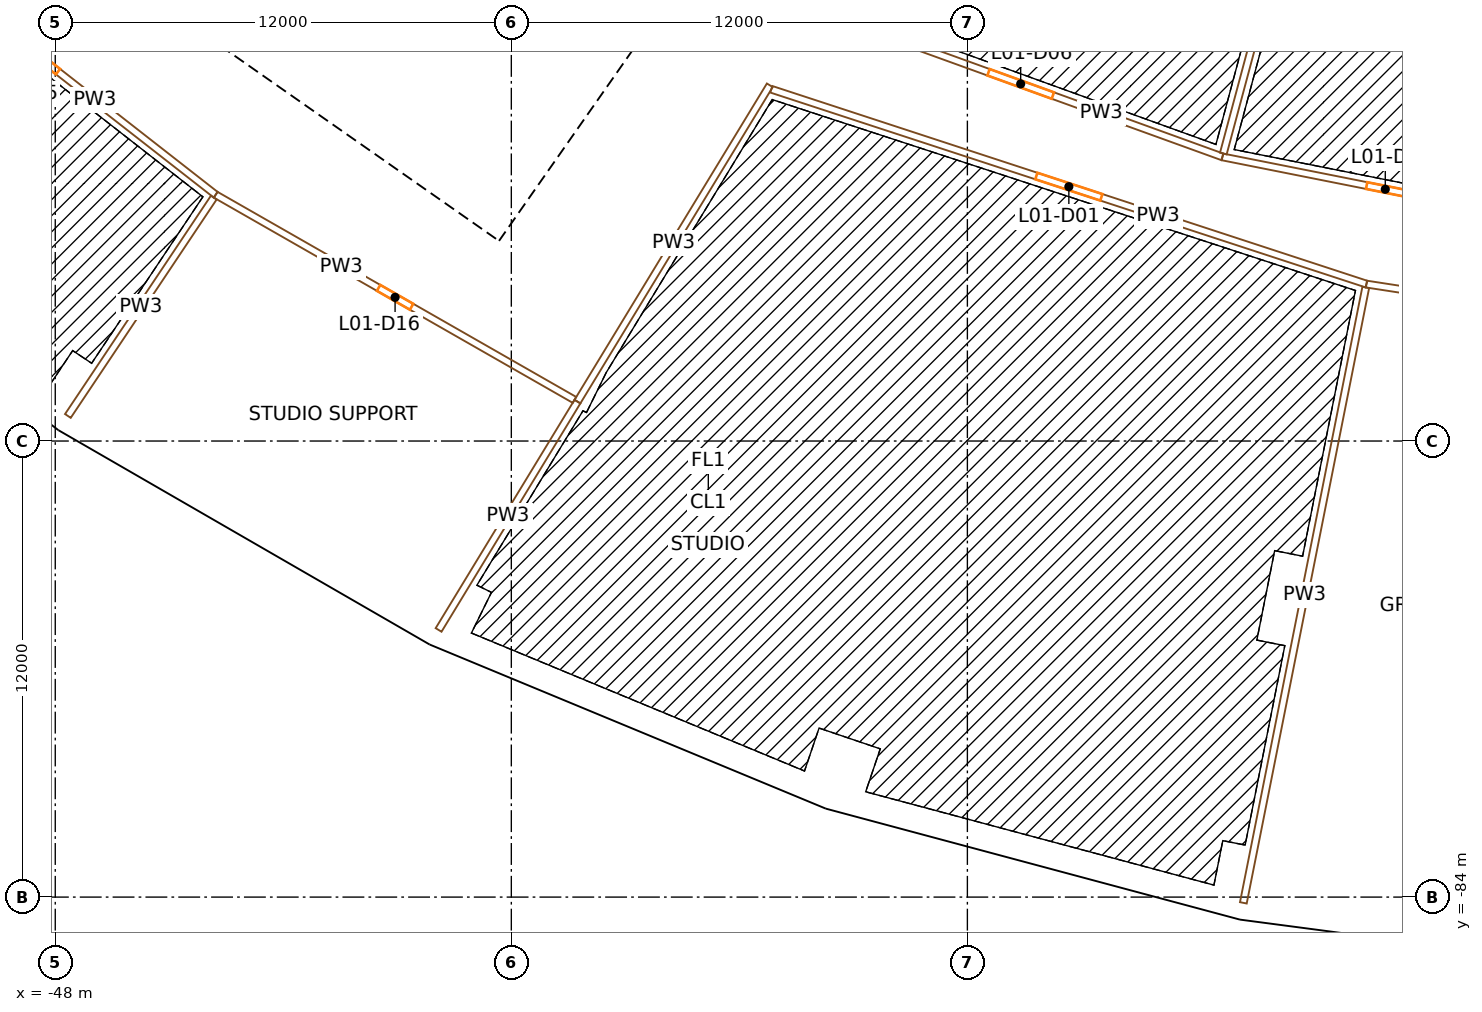
"""IFC4 building model, lengths in metres.
Left out: names, types, materials, properties, quantities, classifications, styles, units other than length and angle.
Written with IfcOpenShell. Run it as: python <this file> out.ifc"""

import sys

from ifc_helpers import new_model, si_unit, direction, frame, frame_2d, origin, origin_2d, place, context, subcontext, project, spatial, rectangle, extrude, element, fill, save


model = new_model("IFC4")
c1 = context("Model", 3, precision=1e-05, world=origin(), true_north=direction((0.0, 1.0)))
c2 = subcontext(c1, "Body", "Model", "MODEL_VIEW")
j1 = project(units=[si_unit("LENGTHUNIT", "METRE"), si_unit("PLANEANGLEUNIT", "RADIAN")], contexts=[c1])
p1 = place(None, origin())
s1 = spatial("IfcSite", under=j1, at=p1, CompositionType="ELEMENT")
p2 = place(p1, origin())
s2 = spatial("IfcBuilding", under=s1, at=p2, CompositionType="ELEMENT")
p3 = place(p2, frame((0.0, 0.0, 9.0)))
s3 = spatial("IfcBuildingStorey", under=s2, at=p3, CompositionType="ELEMENT", Elevation=9.0)
p4 = place(p3, frame((-43.196, -64.647, 0.0), z_axis=(0.0, 0.0, 1.0), x_axis=(0.831469612303, -0.55557023302, 0.0)))
e1 = element("IfcColumn", 1, at=p4, inside=s3, PredefinedType="COLUMN", context=c2, shape_type="SweptSolid", body=[
    extrude(rectangle(XDim=1.4, YDim=1.8, at=origin_2d()), origin(), (0.0, 0.0, 1.0), 9.0),
])
p5 = place(p3, frame((-47.362, -70.883, 0.0), z_axis=(0.0, 0.0, 1.0), x_axis=(0.831469612303, -0.55557023302, 0.0)))
e2 = element("IfcColumn", 2, at=p5, inside=s3, PredefinedType="COLUMN", context=c2, shape_type="SweptSolid", body=[
    extrude(rectangle(XDim=1.1, YDim=1.3, at=origin_2d()), origin(), (0.0, 0.0, 1.0), 9.0),
])
p6 = place(p3, frame((-34.388, -69.732, 0.0), z_axis=(0.0, 0.0, 1.0), x_axis=(0.896872741533, -0.442288690219, 0.0)))
e3 = element("IfcColumn", 3, at=p6, inside=s3, PredefinedType="COLUMN", context=c2, shape_type="SweptSolid", body=[
    extrude(rectangle(XDim=1.4, YDim=1.8, at=origin_2d()), origin(), (0.0, 0.0, 1.0), 9.0),
])
p7 = place(p3, frame((-37.705, -76.458, 0.0), z_axis=(0.0, 0.0, 1.0), x_axis=(0.896872741533, -0.442288690219, 0.0)))
e4 = element("IfcColumn", 4, at=p7, inside=s3, PredefinedType="COLUMN", context=c2, shape_type="SweptSolid", body=[
    extrude(rectangle(XDim=1.1, YDim=1.3, at=origin_2d()), origin(), (0.0, 0.0, 1.0), 9.0),
])
p8 = place(p3, frame((-24.992, -73.624, 0.0), z_axis=(0.0, 0.0, 1.0), x_axis=(0.946930129495, -0.321439465303, 0.0)))
e5 = element("IfcColumn", 5, at=p8, inside=s3, PredefinedType="COLUMN", context=c2, shape_type="SweptSolid", body=[
    extrude(rectangle(XDim=1.4, YDim=1.8, at=origin_2d()), origin(), (0.0, 0.0, 1.0), 9.0),
])
p9 = place(p3, frame((-27.403, -80.726, 0.0), z_axis=(0.0, 0.0, 1.0), x_axis=(0.946930129495, -0.321439465303, 0.0)))
e6 = element("IfcColumn", 6, at=p9, inside=s3, PredefinedType="COLUMN", context=c2, shape_type="SweptSolid", body=[
    extrude(rectangle(XDim=1.1, YDim=1.3, at=origin_2d()), origin(), (0.0, 0.0, 1.0), 9.0),
])
p10 = place(p3, frame((-15.168, -76.256, 0.0), z_axis=(0.0, 0.0, 1.0), x_axis=(0.980785280403, -0.195090322016, 0.0)))
e7 = element("IfcColumn", 7, at=p10, inside=s3, PredefinedType="COLUMN", context=c2, shape_type="SweptSolid", body=[
    extrude(rectangle(XDim=1.4, YDim=1.8, at=origin_2d()), origin(), (0.0, 0.0, 1.0), 9.0),
])
p11 = place(p3, frame((-16.631, -83.612, 0.0), z_axis=(0.0, 0.0, 1.0), x_axis=(0.980785280403, -0.195090322016, 0.0)))
e8 = element("IfcColumn", 8, at=p11, inside=s3, PredefinedType="COLUMN", context=c2, shape_type="SweptSolid", body=[
    extrude(rectangle(XDim=1.1, YDim=1.3, at=origin_2d()), origin(), (0.0, 0.0, 1.0), 9.0),
])
p12 = place(p3, frame((-36.717, -66.337, 0.0), z_axis=(0.0, 0.0, 1.0), x_axis=(0.573577477574, 0.819151315216, 0.0)))
e9 = element("IfcWall", 9, at=p12, inside=s3, PredefinedType="SHEAR", context=c2, shape_type="SweptSolid", body=[
    extrude(rectangle(XDim=14.8, YDim=0.9, at=frame_2d((7.4, 0.0))), origin(), (0.0, 0.0, 1.0), 8.6),
])
p13 = place(p12, frame((6.2, 0.0, 0.0)))
e10 = element("IfcOpeningElement", 10, at=p13, cuts=e9, PredefinedType="OPENING", context=c2, shape_type="SweptSolid", body=[
    extrude(rectangle(XDim=2.4, YDim=2.1, at=frame_2d((1.2, 1.05))), frame((0.0, 0.46, 0.0), z_axis=(0.0, -1.0, 0.0), x_axis=(1.0, 0.0, 0.0)), (0.0, 0.0, 1.0), 0.92),
])
p14 = place(p3, frame((-36.827, -65.71, 0.0), z_axis=(0.0, 0.0, 1.0), x_axis=(-0.819153391756, 0.573574511963, 0.0)))
e11 = element("IfcWall", 11, at=p14, inside=s3, PredefinedType="SHEAR", context=c2, shape_type="SweptSolid", body=[
    extrude(rectangle(XDim=15.045, YDim=0.9, at=frame_2d((7.523, 0.0))), origin(), (0.0, 0.0, 1.0), 8.6),
])
p15 = place(p14, frame((0.8, 0.0, 0.0)))
e12 = element("IfcOpeningElement", 12, at=p15, cuts=e11, PredefinedType="OPENING", context=c2, shape_type="SweptSolid", body=[
    extrude(rectangle(XDim=1.0, YDim=2.1, at=frame_2d((0.5, 1.05))), frame((0.0, 0.46, 0.0), z_axis=(0.0, -1.0, 0.0), x_axis=(1.0, 0.0, 0.0)), (0.0, 0.0, 1.0), 0.92),
])
p16 = place(p14, frame((3.475, 0.0, 0.0)))
e13 = element("IfcOpeningElement", 13, at=p16, cuts=e11, PredefinedType="OPENING", context=c2, shape_type="SweptSolid", body=[
    extrude(rectangle(XDim=1.0, YDim=2.1, at=frame_2d((0.5, 1.05))), frame((0.0, 0.46, 0.0), z_axis=(0.0, -1.0, 0.0), x_axis=(1.0, 0.0, 0.0)), (0.0, 0.0, 1.0), 0.92),
])
p17 = place(p14, frame((6.175, 0.0, 0.0)))
e14 = element("IfcOpeningElement", 14, at=p17, cuts=e11, PredefinedType="OPENING", context=c2, shape_type="SweptSolid", body=[
    extrude(rectangle(XDim=1.0, YDim=2.1, at=frame_2d((0.5, 1.05))), frame((0.0, 0.46, 0.0), z_axis=(0.0, -1.0, 0.0), x_axis=(1.0, 0.0, 0.0)), (0.0, 0.0, 1.0), 0.92),
])
p18 = place(p14, frame((13.495, 0.0, 0.0)))
e15 = element("IfcOpeningElement", 15, at=p18, cuts=e11, PredefinedType="OPENING", context=c2, shape_type="SweptSolid", body=[
    extrude(rectangle(XDim=1.1, YDim=2.1, at=frame_2d((0.55, 1.05))), frame((0.0, 0.46, 0.0), z_axis=(0.0, -1.0, 0.0), x_axis=(1.0, 0.0, 0.0)), (0.0, 0.0, 1.0), 0.92),
])
p19 = place(p3, frame((-35.221, -63.417, 0.0), z_axis=(0.0, 0.0, 1.0), x_axis=(-0.819166993208, 0.573555086491, 0.0)))
e16 = element("IfcWall", 16, at=p19, inside=s3, PredefinedType="SOLIDWALL", context=c2, shape_type="SweptSolid", body=[
    extrude(rectangle(XDim=7.95, YDim=0.3, at=frame_2d((3.975, 0.0))), origin(), (0.0, 0.0, 1.0), 8.6),
])
p20 = place(p3, frame((-37.478, -62.02, 0.0), z_axis=(0.0, 0.0, 1.0), x_axis=(-0.573581496053, -0.819148501424, 0.0)))
e17 = element("IfcWall", 17, at=p20, inside=s3, PredefinedType="PLUMBINGWALL", context=c2, shape_type="SweptSolid", body=[
    extrude(rectangle(XDim=2.2, YDim=0.1, at=frame_2d((1.1, 0.0))), origin(), (0.0, 0.0, 1.0), 8.6),
])
p21 = place(p3, frame((-39.649, -60.5, 0.0), z_axis=(0.0, 0.0, 1.0), x_axis=(-0.573507030513, -0.819200638399, 0.0)))
e18 = element("IfcWall", 18, at=p21, inside=s3, PredefinedType="PLUMBINGWALL", context=c2, shape_type="SweptSolid", body=[
    extrude(rectangle(XDim=2.2, YDim=0.1, at=frame_2d((1.1, 0.0))), origin(), (0.0, 0.0, 1.0), 8.6),
])
p22 = place(p3, frame((-56.673, -64.713, 0.0), z_axis=(0.0, 0.0, 1.0), x_axis=(0.793355377778, -0.608758773695, 0.0)))
e19 = element("IfcWall", 19, at=p22, inside=s3, PredefinedType="SOLIDWALL", context=c2, shape_type="SweptSolid", body=[
    extrude(rectangle(XDim=11.135, YDim=0.45, at=frame_2d((5.567, 0.0))), origin(), (0.0, 0.0, 1.0), 7.7),
])
p23 = place(p3, frame((-47.819, -71.512, 0.0), z_axis=(0.0, 0.0, 1.0), x_axis=(0.866024577697, -0.500001430823, 0.0)))
e20 = element("IfcWall", 20, at=p23, inside=s3, PredefinedType="SOLIDWALL", context=c2, shape_type="SweptSolid", body=[
    extrude(rectangle(XDim=11.312, YDim=0.45, at=frame_2d((5.656, 0.0))), origin(), (0.0, 0.0, 1.0), 7.7),
])
p24 = place(p3, frame((-37.993, -77.176, 0.0), z_axis=(0.0, 0.0, 1.0), x_axis=(0.923874126662, -0.382696482978, 0.0)))
e21 = element("IfcWall", 21, at=p24, inside=s3, PredefinedType="SOLIDWALL", context=c2, shape_type="SweptSolid", body=[
    extrude(rectangle(XDim=11.135, YDim=0.45, at=frame_2d((5.567, 0.0))), origin(), (0.0, 0.0, 1.0), 7.7),
])
p25 = place(p3, frame((-27.681, -81.451, 0.0), z_axis=(0.0, 0.0, 1.0), x_axis=(0.965923678926, -0.258827059038, 0.0)))
e22 = element("IfcWall", 22, at=p25, inside=s3, PredefinedType="SOLIDWALL", context=c2, shape_type="SweptSolid", body=[
    extrude(rectangle(XDim=11.312, YDim=0.45, at=frame_2d((5.656, 0.0))), origin(), (0.0, 0.0, 1.0), 7.7),
])
p26 = place(p3, frame((-16.724, -84.379, 0.0), z_axis=(0.0, 0.0, 1.0), x_axis=(0.991447502826, -0.130506126829, 0.0)))
e23 = element("IfcWall", 23, at=p26, inside=s3, PredefinedType="SOLIDWALL", context=c2, shape_type="SweptSolid", body=[
    extrude(rectangle(XDim=11.135, YDim=0.45, at=frame_2d((5.567, 0.0))), origin(), (0.0, 0.0, 1.0), 7.7),
])
p27 = place(p3, frame((-43.779, -65.52, 0.0), z_axis=(0.0, 0.0, 1.0), x_axis=(-0.788252635542, 0.615351755146, 0.0)))
e24 = element("IfcWall", 24, at=p27, inside=s3, PredefinedType="PARTITIONING", context=c2, shape_type="SweptSolid", body=[
    extrude(rectangle(XDim=11.526, YDim=0.18, at=frame_2d((5.763, 0.0))), origin(), (0.0, 0.0, 1.0), 7.6),
])
p28 = place(p27, frame((5.263, 0.0, 0.0)))
e25 = element("IfcOpeningElement", 25, at=p28, cuts=e24, PredefinedType="OPENING", context=c2, shape_type="SweptSolid", body=[
    extrude(rectangle(XDim=1.0, YDim=2.1, at=frame_2d((0.5, 1.05))), frame((0.0, 0.1, 0.0), z_axis=(0.0, -1.0, 0.0), x_axis=(1.0, 0.0, 0.0)), (0.0, 0.0, 1.0), 0.2),
])
p29 = place(p3, frame((-47.668, -71.34, 0.0), z_axis=(0.0, 0.0, 1.0), x_axis=(0.555588604147, 0.831457336814, 0.0)))
e26 = element("IfcWall", 26, at=p29, inside=s3, PredefinedType="PARTITIONING", context=c2, shape_type="SweptSolid", body=[
    extrude(rectangle(XDim=6.91, YDim=0.18, at=frame_2d((3.455, 0.0))), origin(), (0.0, 0.0, 1.0), 7.6),
])
p30 = place(p3, frame((-34.338, -70.918, 0.0), z_axis=(0.0, 0.0, 1.0), x_axis=(-0.868109106225, 0.496373427663, 0.0)))
e27 = element("IfcWall", 27, at=p30, inside=s3, PredefinedType="PARTITIONING", context=c2, shape_type="SweptSolid", body=[
    extrude(rectangle(XDim=10.875, YDim=0.18, at=frame_2d((5.438, 0.0))), origin(), (0.0, 0.0, 1.0), 7.6),
])
p31 = place(p30, frame((4.938, 0.0, 0.0)))
e28 = element("IfcOpeningElement", 28, at=p31, cuts=e27, PredefinedType="OPENING", context=c2, shape_type="SweptSolid", body=[
    extrude(rectangle(XDim=1.0, YDim=2.1, at=frame_2d((0.5, 1.05))), frame((0.0, 0.1, 0.0), z_axis=(0.0, -1.0, 0.0), x_axis=(1.0, 0.0, 0.0)), (0.0, 0.0, 1.0), 0.2),
])
p32 = place(p3, frame((-34.26, -70.963, 0.0), z_axis=(0.0, 0.0, 1.0), x_axis=(-0.519582317334, -0.854420397412, 0.0)))
e29 = element("IfcWall", 29, at=p32, inside=s3, PredefinedType="PARTITIONING", context=c2, shape_type="SweptSolid", body=[
    extrude(rectangle(XDim=7.032, YDim=0.18, at=frame_2d((3.516, 0.0))), origin(), (0.0, 0.0, 1.0), 7.6),
])
p33 = place(p3, frame((-29.199, -62.639, 0.0), z_axis=(0.0, 0.0, 1.0), x_axis=(-0.519569231187, -0.854428355103, 0.0)))
e30 = element("IfcWall", 30, at=p33, inside=s3, PredefinedType="PARTITIONING", context=c2, shape_type="SweptSolid", body=[
    extrude(rectangle(XDim=9.741, YDim=0.18, at=frame_2d((4.871, 0.0))), origin(), (0.0, 0.0, 1.0), 7.6),
])
p34 = place(p3, frame((-13.5, -67.87, 0.0), z_axis=(0.0, 0.0, 1.0), x_axis=(-0.95037928892, 0.31109356662, 0.0)))
e31 = element("IfcWall", 31, at=p34, inside=s3, PredefinedType="PARTITIONING", context=c2, shape_type="SweptSolid", body=[
    extrude(rectangle(XDim=16.477, YDim=0.18, at=frame_2d((8.239, 0.0))), origin(), (0.0, 0.0, 1.0), 7.6),
])
p35 = place(p34, frame((7.339, 0.0, 0.0)))
e32 = element("IfcOpeningElement", 32, at=p35, cuts=e31, PredefinedType="OPENING", context=c2, shape_type="SweptSolid", body=[
    extrude(rectangle(XDim=1.8, YDim=2.4, at=frame_2d((0.9, 1.2))), frame((0.0, 0.1, 0.0), z_axis=(0.0, -1.0, 0.0), x_axis=(1.0, 0.0, 0.0)), (0.0, 0.0, 1.0), 0.2),
])
p36 = place(p3, frame((-27.906, -60.683, 0.0), z_axis=(0.0, 0.0, 1.0), x_axis=(0.94036474664, -0.340167816345, 0.0)))
e33 = element("IfcWall", 33, at=p36, inside=s3, PredefinedType="PARTITIONING", context=c2, shape_type="SweptSolid", body=[
    extrude(rectangle(XDim=11.29, YDim=0.18, at=frame_2d((5.645, 0.0))), origin(), (0.0, 0.0, 1.0), 7.6),
])
p37 = place(p36, frame((4.745, 0.0, 0.0)))
e34 = element("IfcOpeningElement", 34, at=p37, cuts=e33, PredefinedType="OPENING", context=c2, shape_type="SweptSolid", body=[
    extrude(rectangle(XDim=1.8, YDim=2.1, at=frame_2d((0.9, 1.05))), frame((0.0, 0.1, 0.0), z_axis=(0.0, -1.0, 0.0), x_axis=(1.0, 0.0, 0.0)), (0.0, 0.0, 1.0), 0.2),
])
p38 = place(p3, frame((-17.289, -64.524, 0.0), z_axis=(0.0, 0.0, 1.0), x_axis=(0.980786466832, -0.195084357342, 0.0)))
e35 = element("IfcWall", 35, at=p38, inside=s3, PredefinedType="PARTITIONING", context=c2, shape_type="SweptSolid", body=[
    extrude(rectangle(XDim=8.738, YDim=0.18, at=frame_2d((4.369, 0.0))), origin(), (0.0, 0.0, 1.0), 7.6),
])
p39 = place(p38, frame((3.869, 0.0, 0.0)))
e36 = element("IfcOpeningElement", 36, at=p39, cuts=e35, PredefinedType="OPENING", context=c2, shape_type="SweptSolid", body=[
    extrude(rectangle(XDim=1.0, YDim=2.1, at=frame_2d((0.5, 1.05))), frame((0.0, 0.1, 0.0), z_axis=(0.0, -1.0, 0.0), x_axis=(1.0, 0.0, 0.0)), (0.0, 0.0, 1.0), 0.2),
])
p40 = place(p3, frame((-16.739, -84.151, 0.0), z_axis=(0.0, 0.0, 1.0), x_axis=(0.195089444663, 0.980785454919, 0.0)))
e37 = element("IfcWall", 37, at=p40, inside=s3, PredefinedType="PARTITIONING", context=c2, shape_type="SweptSolid", body=[
    extrude(rectangle(XDim=16.51, YDim=0.18, at=frame_2d((8.255, 0.0))), origin(), (0.0, 0.0, 1.0), 7.6),
])
p41 = place(p3, frame((-7.532, -68.789, 0.0), z_axis=(0.0, 0.0, 1.0), x_axis=(-0.98836608834, 0.152093640297, 0.0)))
e38 = element("IfcWall", 38, at=p41, inside=s3, PredefinedType="PARTITIONING", context=c2, shape_type="SweptSolid", body=[
    extrude(rectangle(XDim=6.039, YDim=0.18, at=frame_2d((3.02, 0.0))), origin(), (0.0, 0.0, 1.0), 7.6),
])
p42 = place(p41, frame((2.52, 0.0, 0.0)))
e39 = element("IfcOpeningElement", 39, at=p42, cuts=e38, PredefinedType="OPENING", context=c2, shape_type="SweptSolid", body=[
    extrude(rectangle(XDim=1.0, YDim=2.1, at=frame_2d((0.5, 1.05))), frame((0.0, 0.1, 0.0), z_axis=(0.0, -1.0, 0.0), x_axis=(1.0, 0.0, 0.0)), (0.0, 0.0, 1.0), 0.2),
])
p43 = place(p3, frame((-12.965, -48.386, 0.0), z_axis=(0.0, 0.0, 1.0), x_axis=(-0.258822009397, -0.965925032004, 0.0)))
e40 = element("IfcWall", 40, at=p43, inside=s3, PredefinedType="PARTITIONING", context=c2, shape_type="SweptSolid", body=[
    extrude(rectangle(XDim=16.617, YDim=0.18, at=frame_2d((8.308, 0.0))), origin(), (0.0, 0.0, 1.0), 7.6),
])
p44 = place(p15, origin())
e41 = element("IfcDoor", 41, at=p44, inside=s3, OperationType="SINGLE_SWING_RIGHT", PredefinedType="DOOR", context=c2, shape_type="SweptSolid", body=[
    extrude(rectangle(XDim=1.0, YDim=2.1, at=frame_2d((0.5, 1.05))), frame((0.0, 0.025, 0.0), z_axis=(0.0, -1.0, 0.0), x_axis=(1.0, 0.0, 0.0)), (0.0, 0.0, 1.0), 0.05),
])
fill(e12, e41)
p45 = place(p16, origin())
e42 = element("IfcDoor", 42, at=p45, inside=s3, OperationType="SINGLE_SWING_LEFT", PredefinedType="DOOR", context=c2, shape_type="SweptSolid", body=[
    extrude(rectangle(XDim=1.0, YDim=2.1, at=frame_2d((0.5, 1.05))), frame((0.0, 0.025, 0.0), z_axis=(0.0, -1.0, 0.0), x_axis=(1.0, 0.0, 0.0)), (0.0, 0.0, 1.0), 0.05),
])
fill(e13, e42)
p46 = place(p17, origin())
e43 = element("IfcDoor", 43, at=p46, inside=s3, OperationType="SINGLE_SWING_RIGHT", PredefinedType="DOOR", context=c2, shape_type="SweptSolid", body=[
    extrude(rectangle(XDim=1.0, YDim=2.1, at=frame_2d((0.5, 1.05))), frame((0.0, 0.025, 0.0), z_axis=(0.0, -1.0, 0.0), x_axis=(1.0, 0.0, 0.0)), (0.0, 0.0, 1.0), 0.05),
])
fill(e14, e43)
p47 = place(p35, origin())
e44 = element("IfcDoor", 44, at=p47, inside=s3, OperationType="DOUBLE_DOOR_SINGLE_SWING", PredefinedType="DOOR", context=c2, shape_type="SweptSolid", body=[
    extrude(rectangle(XDim=1.8, YDim=2.4, at=frame_2d((0.9, 1.2))), frame((0.0, 0.025, 0.0), z_axis=(0.0, -1.0, 0.0), x_axis=(1.0, 0.0, 0.0)), (0.0, 0.0, 1.0), 0.05),
])
fill(e32, e44)
p48 = place(p37, origin())
e45 = element("IfcDoor", 45, at=p48, inside=s3, OperationType="DOUBLE_DOOR_SINGLE_SWING", PredefinedType="DOOR", context=c2, shape_type="SweptSolid", body=[
    extrude(rectangle(XDim=1.8, YDim=2.1, at=frame_2d((0.9, 1.05))), frame((0.0, 0.025, 0.0), z_axis=(0.0, -1.0, 0.0), x_axis=(1.0, 0.0, 0.0)), (0.0, 0.0, 1.0), 0.05),
])
fill(e34, e45)
p49 = place(p39, origin())
e46 = element("IfcDoor", 46, at=p49, inside=s3, OperationType="SINGLE_SWING_RIGHT", PredefinedType="DOOR", context=c2, shape_type="SweptSolid", body=[
    extrude(rectangle(XDim=1.0, YDim=2.1, at=frame_2d((0.5, 1.05))), frame((0.0, 0.025, 0.0), z_axis=(0.0, -1.0, 0.0), x_axis=(1.0, 0.0, 0.0)), (0.0, 0.0, 1.0), 0.05),
])
fill(e36, e46)
p50 = place(p28, origin())
e47 = element("IfcDoor", 47, at=p50, inside=s3, OperationType="SINGLE_SWING_RIGHT", PredefinedType="DOOR", context=c2, shape_type="SweptSolid", body=[
    extrude(rectangle(XDim=1.0, YDim=2.1, at=frame_2d((0.5, 1.05))), frame((0.0, 0.025, 0.0), z_axis=(0.0, -1.0, 0.0), x_axis=(1.0, 0.0, 0.0)), (0.0, 0.0, 1.0), 0.05),
])
fill(e25, e47)
p51 = place(p31, origin())
e48 = element("IfcDoor", 48, at=p51, inside=s3, OperationType="SINGLE_SWING_RIGHT", PredefinedType="DOOR", context=c2, shape_type="SweptSolid", body=[
    extrude(rectangle(XDim=1.0, YDim=2.1, at=frame_2d((0.5, 1.05))), frame((0.0, 0.025, 0.0), z_axis=(0.0, -1.0, 0.0), x_axis=(1.0, 0.0, 0.0)), (0.0, 0.0, 1.0), 0.05),
])
fill(e28, e48)
save(model, sys.argv[1])
